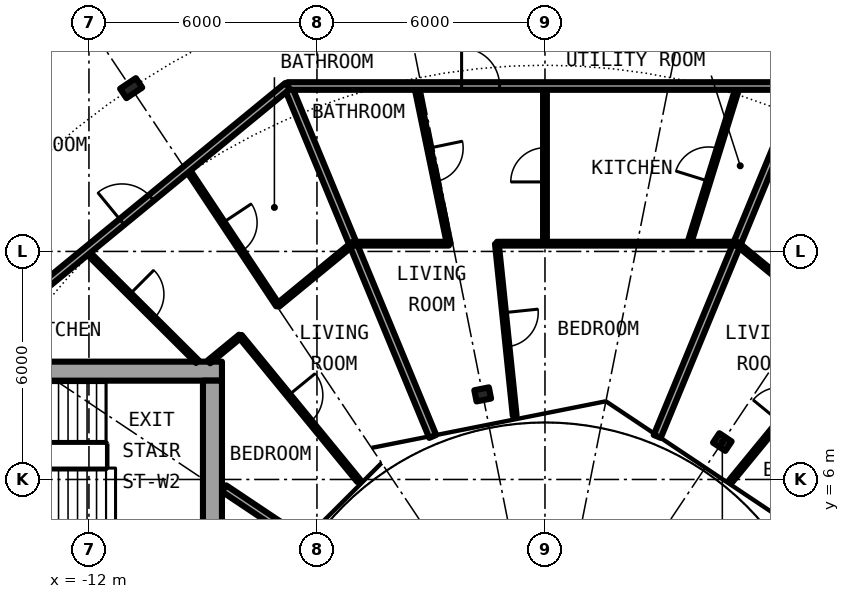
"""IFC4 building model, lengths in metres.
Left out: names, types, materials, properties, quantities, classifications, styles, units other than length and angle.
Written with IfcOpenShell. Run it as: python <this file> out.ifc"""

import sys

from ifc_helpers import new_model, si_unit, direction, frame, frame_2d, origin, origin_2d, place, context, subcontext, project, spatial, rectangle, i_section, extrude, element, fill, save


model = new_model("IFC4")
c1 = context("Model", 3, precision=1e-05, world=origin(), true_north=direction((0.0, 1.0)))
c2 = subcontext(c1, "Body", "Model", "MODEL_VIEW")
j1 = project(units=[si_unit("LENGTHUNIT", "METRE"), si_unit("PLANEANGLEUNIT", "RADIAN")], contexts=[c1])
p1 = place(None, origin())
s1 = spatial("IfcSite", under=j1, at=p1, CompositionType="ELEMENT")
p2 = place(p1, origin())
s2 = spatial("IfcBuilding", under=s1, at=p2, CompositionType="ELEMENT")
p3 = place(p2, frame((0.0, 0.0, 173.8)))
s3 = spatial("IfcBuildingStorey", under=s2, at=p3, CompositionType="ELEMENT", Elevation=173.8)
p4 = place(p3, frame((-10.889, 16.297, 0.0), z_axis=(0.0, 0.0, 1.0), x_axis=(-0.55557023302, 0.831469612303, 0.0)))
e1 = element("IfcColumn", 1, at=p4, inside=s3, PredefinedType="COLUMN", context=c2, shape_type="SweptSolid", body=[
    extrude(i_section(OverallWidth=0.3, OverallDepth=0.5, WebThickness=0.014, FlangeThickness=0.028, FilletRadius=0.027, at=origin_2d()), origin(), (0.0, 0.0, 1.0), 3.05),
])
for number, where, z_axis, x_axis in (
    (2, (4.667, 6.984, 0.0), (0.0, 0.0, 1.0), (0.556, 0.831, 0.0)),
    (3, (-1.639, 8.239, 0.0), (0.0, 0.0, 1.0), (-0.195, 0.981, 0.0)),
):
    element("IfcColumn", number, at=place(p3, frame(where, z_axis=z_axis, x_axis=x_axis)), inside=s3, PredefinedType="COLUMN", context=c2, shape_type="SweptSolid", body=[
        extrude(i_section(OverallWidth=0.3, OverallDepth=0.39, WebThickness=0.011, FlangeThickness=0.019, FilletRadius=0.027, at=origin_2d()), origin(), (0.0, 0.0, 1.0), 3.05),
    ])
p5 = place(p3, frame((-8.5, 8.85, 0.0), z_axis=(0.0, 0.0, 1.0), x_axis=(-1.0, 0.0, 0.0)))
e4 = element("IfcWall", 4, at=p5, inside=s3, PredefinedType="SHEAR", context=c2, shape_type="SweptSolid", body=[
    extrude(rectangle(XDim=13.6, YDim=0.5, at=frame_2d((6.8, 0.0))), origin(), (0.0, 0.0, 1.0), 3.05),
])
p6 = place(p5, frame((11.375, 0.0, 0.0)))
e5 = element("IfcOpeningElement", 5, at=p6, cuts=e4, PredefinedType="OPENING", context=c2, shape_type="SweptSolid", body=[
    extrude(rectangle(XDim=1.2, YDim=2.3, at=frame_2d((0.6, 1.15))), frame((0.0, 0.26, 0.0), z_axis=(0.0, -1.0, 0.0), x_axis=(1.0, 0.0, 0.0)), (0.0, 0.0, 1.0), 0.52),
])
p7 = place(p3, frame((-8.75, 8.6, 0.0), z_axis=(0.0, 0.0, 1.0), x_axis=(0.0, -1.0, 0.0)))
e6 = element("IfcWall", 6, at=p7, inside=s3, PredefinedType="SHEAR", context=c2, shape_type="SweptSolid", body=[
    extrude(rectangle(XDim=17.2, YDim=0.5, at=frame_2d((8.6, 0.0))), origin(), (0.0, 0.0, 1.0), 3.05),
])
p8 = place(p7, frame((7.4, 0.0, 0.1)))
e7 = element("IfcOpeningElement", 7, at=p8, cuts=e6, PredefinedType="OPENING", context=c2, shape_type="SweptSolid", body=[
    extrude(rectangle(XDim=2.4, YDim=2.2, at=frame_2d((1.2, 1.1))), frame((0.0, 0.26, 0.0), z_axis=(0.0, -1.0, 0.0), x_axis=(1.0, 0.0, 0.0)), (0.0, 0.0, 1.0), 0.52),
])
p9 = place(p3, frame((-8.019, 9.771, 0.0), z_axis=(0.0, 0.0, 1.0), x_axis=(0.633851064378, -0.773455123577, 0.0)))
e8 = element("IfcWall", 8, at=p9, inside=s3, PredefinedType="PARTITIONING", context=c2, shape_type="SweptSolid", body=[
    extrude(rectangle(XDim=4.919, YDim=0.1, at=frame_2d((2.46, 0.0))), origin(), (0.0, 0.0, 1.0), 2.7),
])
p10 = place(p9, frame((2.01, 0.0, 0.0)))
e9 = element("IfcOpeningElement", 9, at=p10, cuts=e8, PredefinedType="OPENING", context=c2, shape_type="SweptSolid", body=[
    extrude(rectangle(XDim=0.9, YDim=2.3, at=frame_2d((0.45, 1.15))), frame((0.0, 0.06, 0.0), z_axis=(0.0, -1.0, 0.0), x_axis=(1.0, 0.0, 0.0)), (0.0, 0.0, 1.0), 0.12),
])
p11 = place(p3, frame((-12.069, 12.007, 0.0), z_axis=(0.0, 0.0, 1.0), x_axis=(0.708822693149, -0.705386695138, 0.0)))
e10 = element("IfcWall", 10, at=p11, inside=s3, PredefinedType="PARTITIONING", context=c2, shape_type="SweptSolid", body=[
    extrude(rectangle(XDim=4.121, YDim=0.1, at=frame_2d((2.061, 0.0))), origin(), (0.0, 0.0, 1.0), 2.7),
])
p12 = place(p11, frame((1.611, 0.0, 0.0)))
e11 = element("IfcOpeningElement", 11, at=p12, cuts=e10, PredefinedType="OPENING", context=c2, shape_type="SweptSolid", body=[
    extrude(rectangle(XDim=0.9, YDim=2.3, at=frame_2d((0.45, 1.15))), frame((0.0, 0.06, 0.0), z_axis=(0.0, -1.0, 0.0), x_axis=(1.0, 0.0, 0.0)), (0.0, 0.0, 1.0), 0.12),
])
p13 = place(p3, frame((-9.421, 14.18, 0.0), z_axis=(0.0, 0.0, 1.0), x_axis=(0.553303732327, -0.832979579457, 0.0)))
e12 = element("IfcWall", 12, at=p13, inside=s3, PredefinedType="PARTITIONING", context=c2, shape_type="SweptSolid", body=[
    extrude(rectangle(XDim=4.319, YDim=0.1, at=frame_2d((2.16, 0.0))), origin(), (0.0, 0.0, 1.0), 2.7),
])
p14 = place(p13, frame((1.71, 0.0, 0.0)))
e13 = element("IfcOpeningElement", 13, at=p14, cuts=e12, PredefinedType="OPENING", context=c2, shape_type="SweptSolid", body=[
    extrude(rectangle(XDim=0.9, YDim=2.3, at=frame_2d((0.45, 1.15))), frame((0.0, 0.06, 0.0), z_axis=(0.0, -1.0, 0.0), x_axis=(1.0, 0.0, 0.0)), (0.0, 0.0, 1.0), 0.12),
])
p15 = place(p3, frame((-6.773, 16.353, 0.0), z_axis=(0.0, 0.0, 1.0), x_axis=(0.382632652025, -0.923900564782, 0.0)))
e14 = element("IfcWall", 14, at=p15, inside=s3, PredefinedType="PARTITIONING", context=c2, shape_type="SweptSolid", body=[
    extrude(rectangle(XDim=9.98, YDim=0.2, at=frame_2d((4.99, 0.0))), origin(), (0.0, 0.0, 1.0), 2.7),
])
p16 = place(p3, frame((-3.392, 16.352, 0.0), z_axis=(0.0, 0.0, 1.0), x_axis=(0.202980913894, -0.979182694187, 0.0)))
e15 = element("IfcWall", 15, at=p16, inside=s3, PredefinedType="PARTITIONING", context=c2, shape_type="SweptSolid", body=[
    extrude(rectangle(XDim=4.237, YDim=0.1, at=frame_2d((2.119, 0.0))), origin(), (0.0, 0.0, 1.0), 2.7),
])
p17 = place(p16, frame((1.669, 0.0, 0.0)))
e16 = element("IfcOpeningElement", 16, at=p17, cuts=e15, PredefinedType="OPENING", context=c2, shape_type="SweptSolid", body=[
    extrude(rectangle(XDim=0.9, YDim=2.3, at=frame_2d((0.45, 1.15))), frame((0.0, 0.06, 0.0), z_axis=(0.0, -1.0, 0.0), x_axis=(1.0, 0.0, 0.0)), (0.0, 0.0, 1.0), 0.12),
])
p18 = place(p3, frame((-1.266, 12.204, 0.0), z_axis=(0.0, 0.0, 1.0), x_axis=(0.103089563582, -0.994672077561, 0.0)))
e17 = element("IfcWall", 17, at=p18, inside=s3, PredefinedType="PARTITIONING", context=c2, shape_type="SweptSolid", body=[
    extrude(rectangle(XDim=4.549, YDim=0.1, at=frame_2d((2.275, 0.0))), origin(), (0.0, 0.0, 1.0), 2.7),
])
p19 = place(p18, frame((1.825, 0.0, 0.0)))
e18 = element("IfcOpeningElement", 18, at=p19, cuts=e17, PredefinedType="OPENING", context=c2, shape_type="SweptSolid", body=[
    extrude(rectangle(XDim=0.9, YDim=2.3, at=frame_2d((0.45, 1.15))), frame((0.0, 0.06, 0.0), z_axis=(0.0, -1.0, 0.0), x_axis=(1.0, 0.0, 0.0)), (0.0, 0.0, 1.0), 0.12),
])
p20 = place(p3, frame((0.0, 12.204, 0.0), z_axis=(0.0, 0.0, 1.0), x_axis=(0.0, 1.0, 0.0)))
e19 = element("IfcWall", 19, at=p20, inside=s3, PredefinedType="PARTITIONING", context=c2, shape_type="SweptSolid", body=[
    extrude(rectangle(XDim=4.149, YDim=0.1, at=frame_2d((2.074, 0.0))), origin(), (0.0, 0.0, 1.0), 2.7),
])
p21 = place(p20, frame((1.625, 0.0, 0.0)))
e20 = element("IfcOpeningElement", 20, at=p21, cuts=e19, PredefinedType="OPENING", context=c2, shape_type="SweptSolid", body=[
    extrude(rectangle(XDim=0.9, YDim=2.3, at=frame_2d((0.45, 1.15))), frame((0.0, 0.06, 0.0), z_axis=(0.0, -1.0, 0.0), x_axis=(1.0, 0.0, 0.0)), (0.0, 0.0, 1.0), 0.12),
])
p22 = place(p3, frame((2.954, 7.132, 0.0), z_axis=(0.0, 0.0, 1.0), x_axis=(0.382632652025, 0.923900564782, 0.0)))
e21 = element("IfcWall", 21, at=p22, inside=s3, PredefinedType="PARTITIONING", context=c2, shape_type="SweptSolid", body=[
    extrude(rectangle(XDim=9.98, YDim=0.2, at=frame_2d((4.99, 0.0))), origin(), (0.0, 0.0, 1.0), 2.7),
])
p23 = place(p3, frame((3.792, 12.204, 0.0), z_axis=(0.0, 0.0, 1.0), x_axis=(0.29670674532, 0.954968642041, 0.0)))
e22 = element("IfcWall", 22, at=p23, inside=s3, PredefinedType="PARTITIONING", context=c2, shape_type="SweptSolid", body=[
    extrude(rectangle(XDim=4.344, YDim=0.1, at=frame_2d((2.172, 0.0))), origin(), (0.0, 0.0, 1.0), 2.7),
])
p24 = place(p23, frame((1.722, 0.0, 0.0)))
e23 = element("IfcOpeningElement", 23, at=p24, cuts=e22, PredefinedType="OPENING", context=c2, shape_type="SweptSolid", body=[
    extrude(rectangle(XDim=0.9, YDim=2.3, at=frame_2d((0.45, 1.15))), frame((0.0, 0.06, 0.0), z_axis=(0.0, -1.0, 0.0), x_axis=(1.0, 0.0, 0.0)), (0.0, 0.0, 1.0), 0.12),
])
p25 = place(p3, frame((4.898, 5.968, 0.0), z_axis=(0.0, 0.0, 1.0), x_axis=(0.634401778971, 0.773003481776, 0.0)))
e24 = element("IfcWall", 24, at=p25, inside=s3, PredefinedType="PARTITIONING", context=c2, shape_type="SweptSolid", body=[
    extrude(rectangle(XDim=4.92, YDim=0.1, at=frame_2d((2.46, 0.0))), origin(), (0.0, 0.0, 1.0), 2.7),
])
p26 = place(p25, frame((2.01, 0.0, 0.0)))
e25 = element("IfcOpeningElement", 25, at=p26, cuts=e24, PredefinedType="OPENING", context=c2, shape_type="SweptSolid", body=[
    extrude(rectangle(XDim=0.9, YDim=2.3, at=frame_2d((0.45, 1.15))), frame((0.0, 0.06, 0.0), z_axis=(0.0, -1.0, 0.0), x_axis=(1.0, 0.0, 0.0)), (0.0, 0.0, 1.0), 0.12),
])
p27 = place(p3, frame((-6.513, 4.472, 0.0), z_axis=(0.0, 0.0, 1.0), x_axis=(-0.83133816625, 0.555766905579, 0.0)))
e26 = element("IfcWall", 26, at=p27, inside=s3, PredefinedType="PARTITIONING", context=c2, shape_type="SweptSolid", body=[
    extrude(rectangle(XDim=2.323, YDim=0.2, at=frame_2d((1.162, 0.0))), origin(), (0.0, 0.0, 1.0), 2.7),
])
p28 = place(p3, frame((-5.055, 12.204, 0.0), z_axis=(0.0, 0.0, 1.0), x_axis=(1.0, 0.0, 0.0)))
e27 = element("IfcWall", 27, at=p28, inside=s3, PredefinedType="PARTITIONING", context=c2, shape_type="SweptSolid", body=[
    extrude(rectangle(XDim=2.528, YDim=0.1, at=frame_2d((1.264, 0.0))), origin(), (0.0, 0.0, 1.0), 2.7),
])
p29 = place(p3, frame((-1.264, 12.204, 0.0), z_axis=(0.0, 0.0, 1.0), x_axis=(1.0, 0.0, 0.0)))
e28 = element("IfcWall", 28, at=p29, inside=s3, PredefinedType="PARTITIONING", context=c2, shape_type="SweptSolid", body=[
    extrude(rectangle(XDim=6.319, YDim=0.1, at=frame_2d((3.159, 0.0))), origin(), (0.0, 0.0, 1.0), 2.7),
])
p30 = place(p3, frame((-8.842, 9.095, 0.0), z_axis=(0.0, 0.0, 1.0), x_axis=(0.772730269942, 0.634734534995, 0.0)))
e29 = element("IfcWall", 29, at=p30, inside=s3, PredefinedType="PARTITIONING", context=c2, shape_type="SweptSolid", body=[
    extrude(rectangle(XDim=1.065, YDim=0.1, at=frame_2d((0.532, 0.0))), origin(), (0.0, 0.0, 1.0), 2.7),
])
for number, where, z_axis, x_axis in (
    (30, (-7.034, 10.58, 0.0), (0.0, 0.0, 1.0), (0.773, 0.635, 0.0)),
    (31, (5.058, 12.203, 0.0), (0.0, 0.0, 1.0), (0.773, -0.635, 0.0)),
):
    element("IfcWall", number, at=place(p3, frame(where, z_axis=z_axis, x_axis=x_axis)), inside=s3, PredefinedType="PARTITIONING", context=c2, shape_type="SweptSolid", body=[
        extrude(rectangle(XDim=2.557, YDim=0.1, at=frame_2d((1.278, 0.0))), origin(), (0.0, 0.0, 1.0), 2.7),
    ])
p31 = place(p3, frame((-6.773, 16.353, 0.0), z_axis=(0.0, 0.0, 1.0), x_axis=(1.0, 0.0, 0.0)))
e32 = element("IfcWall", 32, at=p31, inside=s3, PredefinedType="PARTITIONING", context=c2, shape_type="SweptSolid", body=[
    extrude(rectangle(XDim=13.546, YDim=0.2, at=frame_2d((6.773, 0.0))), origin(), (0.0, 0.0, 1.0), 2.7),
])
p32 = place(p31, frame((4.579, 0.0, 0.0)))
e33 = element("IfcOpeningElement", 33, at=p32, cuts=e32, PredefinedType="OPENING", context=c2, shape_type="SweptSolid", body=[
    extrude(rectangle(XDim=1.0, YDim=2.3, at=frame_2d((0.5, 1.15))), frame((0.0, 0.11, 0.0), z_axis=(0.0, -1.0, 0.0), x_axis=(1.0, 0.0, 0.0)), (0.0, 0.0, 1.0), 0.22),
])
p33 = place(p3, frame((-14.717, 9.834, 0.0), z_axis=(0.0, 0.0, 1.0), x_axis=(0.773034536097, 0.634363938131, 0.0)))
e34 = element("IfcWall", 34, at=p33, inside=s3, PredefinedType="PARTITIONING", context=c2, shape_type="SweptSolid", body=[
    extrude(rectangle(XDim=10.277, YDim=0.2, at=frame_2d((5.138, 0.0))), origin(), (0.0, 0.0, 1.0), 2.7),
])
p34 = place(p33, frame((4.638, 0.0, 0.0)))
e35 = element("IfcOpeningElement", 35, at=p34, cuts=e34, PredefinedType="OPENING", context=c2, shape_type="SweptSolid", body=[
    extrude(rectangle(XDim=1.0, YDim=2.3, at=frame_2d((0.5, 1.15))), frame((0.0, 0.11, 0.0), z_axis=(0.0, -1.0, 0.0), x_axis=(1.0, 0.0, 0.0)), (0.0, 0.0, 1.0), 0.22),
])
p35 = place(p3, frame((-14.147, 17.238, 0.0), z_axis=(0.0, 0.0, 1.0), x_axis=(0.923860535822, 0.382729291212, 0.0)))
e36 = element("IfcWall", 36, at=p35, inside=s3, PredefinedType="PARTITIONING", context=c2, shape_type="SweptSolid", body=[
    extrude(rectangle(XDim=12.947, YDim=0.2, at=frame_2d((6.473, 0.0))), origin(), (0.0, 0.0, 1.0), 2.7),
])
p36 = place(p35, frame((7.053, 0.0, 0.0)))
e37 = element("IfcOpeningElement", 37, at=p36, cuts=e36, PredefinedType="OPENING", context=c2, shape_type="SweptSolid", body=[
    extrude(rectangle(XDim=1.0, YDim=2.3, at=frame_2d((0.5, 1.15))), frame((0.0, 0.11, 0.0), z_axis=(0.0, -1.0, 0.0), x_axis=(1.0, 0.0, 0.0)), (0.0, 0.0, 1.0), 0.22),
])
p37 = place(p32, origin())
e38 = element("IfcDoor", 38, at=p37, inside=s3, OperationType="SINGLE_SWING_LEFT", PredefinedType="DOOR", context=c2, shape_type="SweptSolid", body=[
    extrude(rectangle(XDim=1.0, YDim=2.3, at=frame_2d((0.5, 1.15))), frame((0.0, 0.025, 0.0), z_axis=(0.0, -1.0, 0.0), x_axis=(1.0, 0.0, 0.0)), (0.0, 0.0, 1.0), 0.05),
])
fill(e33, e38)
p38 = place(p17, origin())
e39 = element("IfcDoor", 39, at=p38, inside=s3, OperationType="SINGLE_SWING_RIGHT", PredefinedType="DOOR", context=c2, shape_type="SweptSolid", body=[
    extrude(rectangle(XDim=0.9, YDim=2.3, at=frame_2d((0.45, 1.15))), frame((0.0, 0.025, 0.0), z_axis=(0.0, -1.0, 0.0), x_axis=(1.0, 0.0, 0.0)), (0.0, 0.0, 1.0), 0.05),
])
fill(e16, e39)
p39 = place(p21, origin())
e40 = element("IfcDoor", 40, at=p39, inside=s3, OperationType="SINGLE_SWING_RIGHT", PredefinedType="DOOR", context=c2, shape_type="SweptSolid", body=[
    extrude(rectangle(XDim=0.9, YDim=2.3, at=frame_2d((0.45, 1.15))), frame((0.0, 0.025, 0.0), z_axis=(0.0, -1.0, 0.0), x_axis=(1.0, 0.0, 0.0)), (0.0, 0.0, 1.0), 0.05),
])
fill(e20, e40)
p40 = place(p24, origin())
e41 = element("IfcDoor", 41, at=p40, inside=s3, OperationType="SINGLE_SWING_LEFT", PredefinedType="DOOR", context=c2, shape_type="SweptSolid", body=[
    extrude(rectangle(XDim=0.9, YDim=2.3, at=frame_2d((0.45, 1.15))), frame((0.0, 0.025, 0.0), z_axis=(0.0, -1.0, 0.0), x_axis=(1.0, 0.0, 0.0)), (0.0, 0.0, 1.0), 0.05),
])
fill(e23, e41)
p41 = place(p19, origin())
e42 = element("IfcDoor", 42, at=p41, inside=s3, OperationType="SINGLE_SWING_RIGHT", PredefinedType="DOOR", context=c2, shape_type="SweptSolid", body=[
    extrude(rectangle(XDim=0.9, YDim=2.3, at=frame_2d((0.45, 1.15))), frame((0.0, 0.025, 0.0), z_axis=(0.0, -1.0, 0.0), x_axis=(1.0, 0.0, 0.0)), (0.0, 0.0, 1.0), 0.05),
])
fill(e18, e42)
p42 = place(p34, origin())
e43 = element("IfcDoor", 43, at=p42, inside=s3, OperationType="SINGLE_SWING_LEFT", PredefinedType="DOOR", context=c2, shape_type="SweptSolid", body=[
    extrude(rectangle(XDim=1.0, YDim=2.3, at=frame_2d((0.5, 1.15))), frame((0.0, 0.025, 0.0), z_axis=(0.0, -1.0, 0.0), x_axis=(1.0, 0.0, 0.0)), (0.0, 0.0, 1.0), 0.05),
])
fill(e35, e43)
p43 = place(p14, origin())
e44 = element("IfcDoor", 44, at=p43, inside=s3, OperationType="SINGLE_SWING_RIGHT", PredefinedType="DOOR", context=c2, shape_type="SweptSolid", body=[
    extrude(rectangle(XDim=0.9, YDim=2.3, at=frame_2d((0.45, 1.15))), frame((0.0, 0.025, 0.0), z_axis=(0.0, -1.0, 0.0), x_axis=(1.0, 0.0, 0.0)), (0.0, 0.0, 1.0), 0.05),
])
fill(e13, e44)
p44 = place(p12, origin())
e45 = element("IfcDoor", 45, at=p44, inside=s3, OperationType="SINGLE_SWING_RIGHT", PredefinedType="DOOR", context=c2, shape_type="SweptSolid", body=[
    extrude(rectangle(XDim=0.9, YDim=2.3, at=frame_2d((0.45, 1.15))), frame((0.0, 0.025, 0.0), z_axis=(0.0, -1.0, 0.0), x_axis=(1.0, 0.0, 0.0)), (0.0, 0.0, 1.0), 0.05),
])
fill(e11, e45)
p45 = place(p10, origin())
e46 = element("IfcDoor", 46, at=p45, inside=s3, OperationType="SINGLE_SWING_RIGHT", PredefinedType="DOOR", context=c2, shape_type="SweptSolid", body=[
    extrude(rectangle(XDim=0.9, YDim=2.3, at=frame_2d((0.45, 1.15))), frame((0.0, 0.025, 0.0), z_axis=(0.0, -1.0, 0.0), x_axis=(1.0, 0.0, 0.0)), (0.0, 0.0, 1.0), 0.05),
])
fill(e9, e46)
save(model, sys.argv[1])
